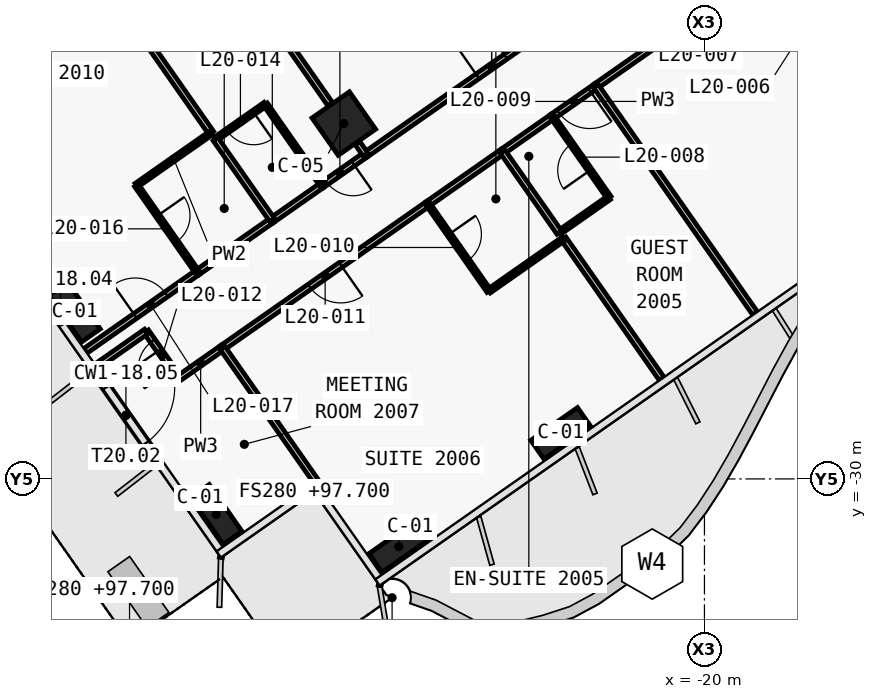
"""IFC4 building model, lengths in metres.
Left out: names, types, materials, properties, quantities, classifications, styles, units other than length and angle.
Written with IfcOpenShell. Run it as: python <this file> out.ifc"""

import sys

from ifc_helpers import new_model, si_unit, direction, frame, frame_2d, origin, origin_2d, place, context, subcontext, project, spatial, rectangle, extrude, element, fill, save


model = new_model("IFC4")
c1 = context("Model", 3, precision=1e-05, world=origin(), true_north=direction((0.0, 1.0)))
c2 = subcontext(c1, "Body", "Model", "MODEL_VIEW")
j1 = project(units=[si_unit("LENGTHUNIT", "METRE"), si_unit("PLANEANGLEUNIT", "RADIAN")], contexts=[c1])
p1 = place(None, origin())
s1 = spatial("IfcSite", under=j1, at=p1, CompositionType="ELEMENT")
p2 = place(p1, origin())
s2 = spatial("IfcBuilding", under=s1, at=p2, CompositionType="ELEMENT")
p3 = place(p2, frame((0.0, 0.0, 97.7)))
s3 = spatial("IfcBuildingStorey", under=s2, at=p3, CompositionType="ELEMENT", Elevation=97.7)
for number, where, z_axis, x_axis in (
    (1, (-23.782, -28.799, 0.0), (0.0, 0.0, 1.0), (-0.819, -0.574, 0.0)),
    (2, (-28.042, -31.782, 0.0), (0.0, 0.0, 1.0), (-0.819, -0.574, 0.0)),
    (3, (-32.847, -30.935, 0.0), (0.0, 0.0, 1.0), (-0.574, 0.819, 0.0)),
    (4, (-36.575, -25.61, 0.0), (0.0, 0.0, 1.0), (-0.574, 0.819, 0.0)),
):
    element("IfcColumn", number, at=place(p3, frame(where, z_axis=z_axis, x_axis=x_axis)), inside=s3, PredefinedType="COLUMN", context=c2, shape_type="SweptSolid", body=[
        extrude(rectangle(XDim=1.5, YDim=0.6, at=origin_2d()), origin(), (0.0, 0.0, 1.0), 3.6),
    ])
p4 = place(p3, frame((-29.49, -20.649, 0.0), z_axis=(0.0, 0.0, 1.0), x_axis=(-0.819152044289, -0.573576436351, 0.0)))
e5 = element("IfcColumn", 5, at=p4, inside=s3, PredefinedType="COLUMN", context=c2, shape_type="SweptSolid", body=[
    extrude(rectangle(XDim=1.2, YDim=1.2, at=origin_2d()), origin(), (0.0, 0.0, 1.0), 3.6),
])
p5 = place(p3, frame((-36.066, -27.122, 0.0), z_axis=(0.0, 0.0, 1.0), x_axis=(0.573584953252, -0.819146080625, 0.0)))
e6 = element("IfcWall", 6, at=p5, inside=s3, PredefinedType="SOLIDWALL", context=c2, shape_type="SweptSolid", body=[
    extrude(rectangle(XDim=2.94, YDim=0.2, at=frame_2d((1.47, 0.0))), origin(), (0.0, 0.0, 1.0), 3.32),
])
p6 = place(p5, frame((0.57, 0.0, 0.0)))
e7 = element("IfcOpeningElement", 7, at=p6, cuts=e6, PredefinedType="OPENING", context=c2, shape_type="SweptSolid", body=[
    extrude(rectangle(XDim=1.8, YDim=2.4, at=frame_2d((0.9, 1.2))), frame((0.0, 0.11, 0.0), z_axis=(0.0, -1.0, 0.0), x_axis=(1.0, 0.0, 0.0)), (0.0, 0.0, 1.0), 0.22),
])
p7 = place(p3, frame((-28.917, -21.469, 0.0), z_axis=(0.0, 0.0, 1.0), x_axis=(0.819152599934, 0.573575642807, 0.0)))
e8 = element("IfcWall", 8, at=p7, inside=s3, PredefinedType="PARTITIONING", context=c2, shape_type="SweptSolid", body=[
    extrude(rectangle(XDim=8.098, YDim=0.15, at=frame_2d((4.049, 0.0))), origin(), (0.0, 0.0, 1.0), 2.6),
])
p8 = place(p7, frame((3.599, 0.0, 0.0)))
e9 = element("IfcOpeningElement", 9, at=p8, cuts=e8, PredefinedType="OPENING", context=c2, shape_type="SweptSolid", body=[
    extrude(rectangle(XDim=0.9, YDim=2.1, at=frame_2d((0.45, 1.05))), frame((0.0, 0.085, 0.0), z_axis=(0.0, -1.0, 0.0), x_axis=(1.0, 0.0, 0.0)), (0.0, 0.0, 1.0), 0.17),
])
p9 = place(p3, frame((-28.914, -21.467, 0.0), z_axis=(0.0, 0.0, 1.0), x_axis=(-0.81914197737, -0.573590813132, 0.0)))
e10 = element("IfcWall", 10, at=p9, inside=s3, PredefinedType="PARTITIONING", context=c2, shape_type="SweptSolid", body=[
    extrude(rectangle(XDim=1.403, YDim=0.15, at=frame_2d((0.701, 0.0))), origin(), (0.0, 0.0, 1.0), 2.6),
])
p10 = place(p9, frame((0.403, 0.0, 0.0)))
e11 = element("IfcOpeningElement", 11, at=p10, cuts=e10, PredefinedType="OPENING", context=c2, shape_type="SweptSolid", body=[
    extrude(rectangle(XDim=0.85, YDim=2.1, at=frame_2d((0.425, 1.05))), frame((0.0, 0.085, 0.0), z_axis=(0.0, -1.0, 0.0), x_axis=(1.0, 0.0, 0.0)), (0.0, 0.0, 1.0), 0.17),
])
p11 = place(p3, frame((-31.375, -23.19, 0.0), z_axis=(0.0, 0.0, 1.0), x_axis=(0.819189013667, 0.573523634986, 0.0)))
e12 = element("IfcWall", 12, at=p11, inside=s3, PredefinedType="PARTITIONING", context=c2, shape_type="SweptSolid", body=[
    extrude(rectangle(XDim=1.604, YDim=0.15, at=frame_2d((0.802, 0.0))), origin(), (0.0, 0.0, 1.0), 3.32),
])
p12 = place(p3, frame((-36.288, -26.63, 0.0), z_axis=(0.0, 0.0, 1.0), x_axis=(0.819171400631, 0.573548791636, 0.0)))
e13 = element("IfcWall", 13, at=p12, inside=s3, PredefinedType="PARTITIONING", context=c2, shape_type="SweptSolid", body=[
    extrude(rectangle(XDim=3.601, YDim=0.15, at=frame_2d((1.801, 0.0))), origin(), (0.0, 0.0, 1.0), 2.5),
])
p13 = place(p12, frame((1.6, 0.0, 0.0)))
e14 = element("IfcOpeningElement", 14, at=p13, cuts=e13, PredefinedType="OPENING", context=c2, shape_type="SweptSolid", body=[
    extrude(rectangle(XDim=1.0, YDim=2.1, at=frame_2d((0.5, 1.05))), frame((0.0, 0.085, 0.0), z_axis=(0.0, -1.0, 0.0), x_axis=(1.0, 0.0, 0.0)), (0.0, 0.0, 1.0), 0.17),
])
p14 = place(p3, frame((-33.341, -24.566, 0.0), z_axis=(0.0, 0.0, 1.0), x_axis=(0.819179439794, 0.573537309527, 0.0)))
e15 = element("IfcWall", 15, at=p14, inside=s3, PredefinedType="PARTITIONING", context=c2, shape_type="SweptSolid", body=[
    extrude(rectangle(XDim=2.404, YDim=0.15, at=frame_2d((1.202, 0.0))), origin(), (0.0, 0.0, 1.0), 3.32),
])
p15 = place(p3, frame((-17.447, -15.879, 0.0), z_axis=(0.0, 0.0, 1.0), x_axis=(-0.819153746897, -0.573574004767, 0.0)))
e16 = element("IfcWall", 16, at=p15, inside=s3, PredefinedType="PARTITIONING", context=c2, shape_type="SweptSolid", body=[
    extrude(rectangle(XDim=6.603, YDim=0.15, at=frame_2d((3.302, 0.0))), origin(), (0.0, 0.0, 1.0), 2.6),
])
p16 = place(p15, frame((2.801, 0.0, 0.0)))
e17 = element("IfcOpeningElement", 17, at=p16, cuts=e16, PredefinedType="OPENING", context=c2, shape_type="SweptSolid", body=[
    extrude(rectangle(XDim=1.0, YDim=2.1, at=frame_2d((0.5, 1.05))), frame((0.0, 0.085, 0.0), z_axis=(0.0, -1.0, 0.0), x_axis=(1.0, 0.0, 0.0)), (0.0, 0.0, 1.0), 0.17),
])
p17 = place(p3, frame((-22.852, -19.664, 0.0), z_axis=(0.0, 0.0, 1.0), x_axis=(-0.81914197737, -0.573590813132, 0.0)))
e18 = element("IfcWall", 18, at=p17, inside=s3, PredefinedType="PARTITIONING", context=c2, shape_type="SweptSolid", body=[
    extrude(rectangle(XDim=1.403, YDim=0.15, at=frame_2d((0.701, 0.0))), origin(), (0.0, 0.0, 1.0), 3.32),
])
p18 = place(p17, frame((0.202, 0.0, 0.0)))
e19 = element("IfcOpeningElement", 19, at=p18, cuts=e18, PredefinedType="OPENING", context=c2, shape_type="SweptSolid", body=[
    extrude(rectangle(XDim=1.0, YDim=2.1, at=frame_2d((0.5, 1.05))), frame((0.0, 0.085, 0.0), z_axis=(0.0, -1.0, 0.0), x_axis=(1.0, 0.0, 0.0)), (0.0, 0.0, 1.0), 0.17),
])
p19 = place(p3, frame((-23.999, -20.467, 0.0), z_axis=(0.0, 0.0, 1.0), x_axis=(-0.819117502046, -0.573625764625, 0.0)))
e20 = element("IfcWall", 20, at=p19, inside=s3, PredefinedType="PARTITIONING", context=c2, shape_type="SweptSolid", body=[
    extrude(rectangle(XDim=1.604, YDim=0.15, at=frame_2d((0.802, 0.0))), origin(), (0.0, 0.0, 1.0), 3.32),
])
p20 = place(p3, frame((-27.276, -22.761, 0.0), z_axis=(0.0, 0.0, 1.0), x_axis=(-0.819153746897, -0.573574004767, 0.0)))
e21 = element("IfcWall", 21, at=p20, inside=s3, PredefinedType="PARTITIONING", context=c2, shape_type="SweptSolid", body=[
    extrude(rectangle(XDim=6.603, YDim=0.15, at=frame_2d((3.302, 0.0))), origin(), (0.0, 0.0, 1.0), 2.6),
])
p21 = place(p20, frame((2.801, 0.0, 0.0)))
e22 = element("IfcOpeningElement", 22, at=p21, cuts=e21, PredefinedType="OPENING", context=c2, shape_type="SweptSolid", body=[
    extrude(rectangle(XDim=1.0, YDim=2.1, at=frame_2d((0.5, 1.05))), frame((0.0, 0.085, 0.0), z_axis=(0.0, -1.0, 0.0), x_axis=(1.0, 0.0, 0.0)), (0.0, 0.0, 1.0), 0.17),
])
p22 = place(p3, frame((-25.31, -21.384, 0.0), z_axis=(0.0, 0.0, 1.0), x_axis=(-0.819146032251, -0.573585022335, 0.0)))
e23 = element("IfcWall", 23, at=p22, inside=s3, PredefinedType="PARTITIONING", context=c2, shape_type="SweptSolid", body=[
    extrude(rectangle(XDim=2.404, YDim=0.15, at=frame_2d((1.202, 0.0))), origin(), (0.0, 0.0, 1.0), 3.32),
])
p23 = place(p3, frame((-33.83, -27.351, 0.0), z_axis=(0.0, 0.0, 1.0), x_axis=(-0.573669850876, 0.819086626796, 0.0)))
e24 = element("IfcWall", 24, at=p23, inside=s3, PredefinedType="PARTITIONING", context=c2, shape_type="SweptSolid", body=[
    extrude(rectangle(XDim=1.5, YDim=0.15, at=frame_2d((0.75, 0.0))), origin(), (0.0, 0.0, 1.0), 3.32),
])
p24 = place(p23, frame((0.3, 0.0, 0.0)))
e25 = element("IfcOpeningElement", 25, at=p24, cuts=e24, PredefinedType="OPENING", context=c2, shape_type="SweptSolid", body=[
    extrude(rectangle(XDim=0.9, YDim=2.1, at=frame_2d((0.45, 1.05))), frame((0.0, 0.085, 0.0), z_axis=(0.0, -1.0, 0.0), x_axis=(1.0, 0.0, 0.0)), (0.0, 0.0, 1.0), 0.17),
])
p25 = place(p3, frame((-34.691, -26.122, 0.0), z_axis=(0.0, 0.0, 1.0), x_axis=(-0.819059844958, -0.573708088123, 0.0)))
e26 = element("IfcWall", 26, at=p25, inside=s3, PredefinedType="PARTITIONING", context=c2, shape_type="SweptSolid", body=[
    extrude(rectangle(XDim=1.6, YDim=0.15, at=frame_2d((0.8, 0.0))), origin(), (0.0, 0.0, 1.0), 2.5),
])
p26 = place(p3, frame((-32.682, -26.546, 0.0), z_axis=(0.0, 0.0, 1.0), x_axis=(-0.819133738125, -0.573602579375, 0.0)))
e27 = element("IfcWall", 27, at=p26, inside=s3, PredefinedType="PARTITIONING", context=c2, shape_type="SweptSolid", body=[
    extrude(rectangle(XDim=1.402, YDim=0.15, at=frame_2d((0.701, 0.0))), origin(), (0.0, 0.0, 1.0), 3.32),
])
p27 = place(p3, frame((-28.916, -21.468, 0.0), z_axis=(0.0, 0.0, 1.0), x_axis=(-0.572944929411, 0.819593867633, 0.0)))
e28 = element("IfcWall", 28, at=p27, inside=s3, PredefinedType="PARTITIONING", context=c2, shape_type="SweptSolid", body=[
    extrude(rectangle(XDim=0.38, YDim=0.15, at=frame_2d((0.19, 0.0))), origin(), (0.0, 0.0, 1.0), 2.6),
])
p28 = place(p3, frame((-29.845, -20.141, 0.0), z_axis=(0.0, 0.0, 1.0), x_axis=(-0.573558725113, 0.819164445546, 0.0)))
e29 = element("IfcWall", 29, at=p28, inside=s3, PredefinedType="PARTITIONING", context=c2, shape_type="SweptSolid", body=[
    extrude(rectangle(XDim=9.01, YDim=0.15, at=frame_2d((4.505, 0.0))), origin(), (0.0, 0.0, 1.0), 2.6),
])
p29 = place(p3, frame((-30.062, -22.27, 0.0), z_axis=(0.0, 0.0, 1.0), x_axis=(-0.573537965655, 0.819178980414, 0.0)))
e30 = element("IfcWall", 30, at=p29, inside=s3, PredefinedType="PARTITIONING", context=c2, shape_type="SweptSolid", body=[
    extrude(rectangle(XDim=2.6, YDim=0.12, at=frame_2d((1.3, 0.0))), origin(), (0.0, 0.0, 1.0), 2.6),
])
p30 = place(p3, frame((-31.555, -20.14, 0.0), z_axis=(0.0, 0.0, 1.0), x_axis=(-0.819131543282, -0.57360571371, 0.0)))
e31 = element("IfcWall", 31, at=p30, inside=s3, PredefinedType="PARTITIONING", context=c2, shape_type="SweptSolid", body=[
    extrude(rectangle(XDim=1.6, YDim=0.12, at=frame_2d((0.8, 0.0))), origin(), (0.0, 0.0, 1.0), 3.32),
])
p31 = place(p30, frame((0.375, 0.0, 0.0)))
e32 = element("IfcOpeningElement", 32, at=p31, cuts=e31, PredefinedType="OPENING", context=c2, shape_type="SweptSolid", body=[
    extrude(rectangle(XDim=0.85, YDim=2.05, at=frame_2d((0.425, 1.025))), frame((0.0, 0.07, 0.0), z_axis=(0.0, -1.0, 0.0), x_axis=(1.0, 0.0, 0.0)), (0.0, 0.0, 1.0), 0.14),
])
p32 = place(p3, frame((-32.979, -20.896, 0.0), z_axis=(0.0, 0.0, 1.0), x_axis=(-0.573576058406, 0.819152308929, 0.0)))
e33 = element("IfcWall", 33, at=p32, inside=s3, PredefinedType="PARTITIONING", context=c2, shape_type="SweptSolid", body=[
    extrude(rectangle(XDim=8.501, YDim=0.15, at=frame_2d((4.25, 0.0))), origin(), (0.0, 0.0, 1.0), 2.5),
])
p33 = place(p3, frame((-31.373, -23.189, 0.0), z_axis=(0.0, 0.0, 1.0), x_axis=(-0.573600972199, 0.819134863556, 0.0)))
e34 = element("IfcWall", 34, at=p33, inside=s3, PredefinedType="PARTITIONING", context=c2, shape_type="SweptSolid", body=[
    extrude(rectangle(XDim=2.6, YDim=0.15, at=frame_2d((1.3, 0.0))), origin(), (0.0, 0.0, 1.0), 2.6),
])
p34 = place(p3, frame((-32.98, -20.894, 0.0), z_axis=(0.0, 0.0, 1.0), x_axis=(-0.819155442668, -0.573571582932, 0.0)))
e35 = element("IfcWall", 35, at=p34, inside=s3, PredefinedType="PARTITIONING", context=c2, shape_type="SweptSolid", body=[
    extrude(rectangle(XDim=2.4, YDim=0.12, at=frame_2d((1.2, 0.0))), origin(), (0.0, 0.0, 1.0), 3.32),
])
p35 = place(p3, frame((-34.946, -22.272, 0.0), z_axis=(0.0, 0.0, 1.0), x_axis=(0.573608623498, -0.819129505664, 0.0)))
e36 = element("IfcWall", 36, at=p35, inside=s3, PredefinedType="PARTITIONING", context=c2, shape_type="SweptSolid", body=[
    extrude(rectangle(XDim=2.8, YDim=0.12, at=frame_2d((1.4, 0.0))), origin(), (0.0, 0.0, 1.0), 2.6),
])
p36 = place(p35, frame((0.975, 0.0, 0.0)))
e37 = element("IfcOpeningElement", 37, at=p36, cuts=e36, PredefinedType="OPENING", context=c2, shape_type="SweptSolid", body=[
    extrude(rectangle(XDim=0.85, YDim=2.05, at=frame_2d((0.425, 1.025))), frame((0.0, 0.07, 0.0), z_axis=(0.0, -1.0, 0.0), x_axis=(1.0, 0.0, 0.0)), (0.0, 0.0, 1.0), 0.14),
])
p37 = place(p3, frame((-18.667, -25.645, 0.0), z_axis=(0.0, 0.0, 1.0), x_axis=(-0.573572324301, 0.819154923562, 0.0)))
e38 = element("IfcWall", 38, at=p37, inside=s3, PredefinedType="PARTITIONING", context=c2, shape_type="SweptSolid", body=[
    extrude(rectangle(XDim=7.3, YDim=0.15, at=frame_2d((3.65, 0.0))), origin(), (0.0, 0.0, 1.0), 2.5),
])
p38 = place(p3, frame((-23.819, -23.516, 0.0), z_axis=(0.0, 0.0, 1.0), x_axis=(0.819131543282, 0.57360571371, 0.0)))
e39 = element("IfcWall", 39, at=p38, inside=s3, PredefinedType="PARTITIONING", context=c2, shape_type="SweptSolid", body=[
    extrude(rectangle(XDim=1.6, YDim=0.12, at=frame_2d((0.8, 0.0))), origin(), (0.0, 0.0, 1.0), 3.32),
])
p39 = place(p3, frame((-22.509, -22.597, 0.0), z_axis=(0.0, 0.0, 1.0), x_axis=(-0.573582085028, 0.819148089014, 0.0)))
e40 = element("IfcWall", 40, at=p39, inside=s3, PredefinedType="PARTITIONING", context=c2, shape_type="SweptSolid", body=[
    extrude(rectangle(XDim=2.6, YDim=0.12, at=frame_2d((1.3, 0.0))), origin(), (0.0, 0.0, 1.0), 3.32),
])
p40 = place(p39, frame((0.875, 0.0, 0.0)))
e41 = element("IfcOpeningElement", 41, at=p40, cuts=e40, PredefinedType="OPENING", context=c2, shape_type="SweptSolid", body=[
    extrude(rectangle(XDim=0.85, YDim=2.05, at=frame_2d((0.425, 1.025))), frame((0.0, 0.07, 0.0), z_axis=(0.0, -1.0, 0.0), x_axis=(1.0, 0.0, 0.0)), (0.0, 0.0, 1.0), 0.14),
])
p41 = place(p3, frame((-21.124, -27.365, 0.0), z_axis=(0.0, 0.0, 1.0), x_axis=(-0.573556991349, 0.819165659482, 0.0)))
e42 = element("IfcWall", 42, at=p41, inside=s3, PredefinedType="PARTITIONING", context=c2, shape_type="SweptSolid", body=[
    extrude(rectangle(XDim=4.501, YDim=0.15, at=frame_2d((2.25, 0.0))), origin(), (0.0, 0.0, 1.0), 2.5),
])
p42 = place(p3, frame((-23.82, -23.515, 0.0), z_axis=(0.0, 0.0, 1.0), x_axis=(-0.573537965655, 0.819178980414, 0.0)))
e43 = element("IfcWall", 43, at=p42, inside=s3, PredefinedType="PARTITIONING", context=c2, shape_type="SweptSolid", body=[
    extrude(rectangle(XDim=2.6, YDim=0.15, at=frame_2d((1.3, 0.0))), origin(), (0.0, 0.0, 1.0), 3.32),
])
p43 = place(p3, frame((-27.278, -22.763, 0.0), z_axis=(0.0, 0.0, 1.0), x_axis=(0.573550118428, -0.819170471667, 0.0)))
e44 = element("IfcWall", 44, at=p43, inside=s3, PredefinedType="PARTITIONING", context=c2, shape_type="SweptSolid", body=[
    extrude(rectangle(XDim=2.8, YDim=0.12, at=frame_2d((1.4, 0.0))), origin(), (0.0, 0.0, 1.0), 3.32),
])
p44 = place(p43, frame((0.975, 0.0, 0.0)))
e45 = element("IfcOpeningElement", 45, at=p44, cuts=e44, PredefinedType="OPENING", context=c2, shape_type="SweptSolid", body=[
    extrude(rectangle(XDim=0.85, YDim=2.05, at=frame_2d((0.425, 1.025))), frame((0.0, 0.07, 0.0), z_axis=(0.0, -1.0, 0.0), x_axis=(1.0, 0.0, 0.0)), (0.0, 0.0, 1.0), 0.14),
])
p45 = place(p3, frame((-25.671, -25.056, 0.0), z_axis=(0.0, 0.0, 1.0), x_axis=(0.819188907105, 0.573523787192, 0.0)))
e46 = element("IfcWall", 46, at=p45, inside=s3, PredefinedType="PARTITIONING", context=c2, shape_type="SweptSolid", body=[
    extrude(rectangle(XDim=2.4, YDim=0.12, at=frame_2d((1.2, 0.0))), origin(), (0.0, 0.0, 1.0), 3.32),
])
p46 = place(p3, frame((-30.101, -30.236, 0.0), z_axis=(0.0, 0.0, 1.0), x_axis=(-0.573564243949, 0.819160581365, 0.0)))
e47 = element("IfcWall", 47, at=p46, inside=s3, PredefinedType="PARTITIONING", context=c2, shape_type="SweptSolid", body=[
    extrude(rectangle(XDim=4.502, YDim=0.15, at=frame_2d((2.251, 0.0))), origin(), (0.0, 0.0, 1.0), 3.32),
])
p47 = place(p6, origin())
e48 = element("IfcDoor", 48, at=p47, inside=s3, OperationType="DOUBLE_DOOR_DOUBLE_SWING", PredefinedType="DOOR", context=c2, shape_type="SweptSolid", body=[
    extrude(rectangle(XDim=1.8, YDim=2.4, at=frame_2d((0.9, 1.2))), frame((0.0, 0.025, 0.0), z_axis=(0.0, -1.0, 0.0), x_axis=(1.0, 0.0, 0.0)), (0.0, 0.0, 1.0), 0.05),
])
fill(e7, e48)
p48 = place(p40, origin())
e49 = element("IfcDoor", 49, at=p48, inside=s3, OperationType="SINGLE_SWING_LEFT", PredefinedType="DOOR", context=c2, shape_type="SweptSolid", body=[
    extrude(rectangle(XDim=0.85, YDim=2.05, at=frame_2d((0.425, 1.025))), frame((0.0, 0.025, 0.0), z_axis=(0.0, -1.0, 0.0), x_axis=(1.0, 0.0, 0.0)), (0.0, 0.0, 1.0), 0.05),
])
fill(e41, e49)
p49 = place(p18, origin())
e50 = element("IfcDoor", 50, at=p49, inside=s3, OperationType="SINGLE_SWING_RIGHT", PredefinedType="DOOR", context=c2, shape_type="SweptSolid", body=[
    extrude(rectangle(XDim=1.0, YDim=2.1, at=frame_2d((0.5, 1.05))), frame((0.0, 0.025, 0.0), z_axis=(0.0, -1.0, 0.0), x_axis=(1.0, 0.0, 0.0)), (0.0, 0.0, 1.0), 0.05),
])
fill(e19, e50)
p50 = place(p44, origin())
e51 = element("IfcDoor", 51, at=p50, inside=s3, OperationType="SINGLE_SWING_RIGHT", PredefinedType="DOOR", context=c2, shape_type="SweptSolid", body=[
    extrude(rectangle(XDim=0.85, YDim=2.05, at=frame_2d((0.425, 1.025))), frame((0.0, 0.025, 0.0), z_axis=(0.0, -1.0, 0.0), x_axis=(1.0, 0.0, 0.0)), (0.0, 0.0, 1.0), 0.05),
])
fill(e45, e51)
p51 = place(p21, origin())
e52 = element("IfcDoor", 52, at=p51, inside=s3, OperationType="SINGLE_SWING_RIGHT", PredefinedType="DOOR", context=c2, shape_type="SweptSolid", body=[
    extrude(rectangle(XDim=1.0, YDim=2.1, at=frame_2d((0.5, 1.05))), frame((0.0, 0.025, 0.0), z_axis=(0.0, -1.0, 0.0), x_axis=(1.0, 0.0, 0.0)), (0.0, 0.0, 1.0), 0.05),
])
fill(e22, e52)
p52 = place(p24, origin())
e53 = element("IfcDoor", 53, at=p52, inside=s3, OperationType="SINGLE_SWING_LEFT", PredefinedType="DOOR", context=c2, shape_type="SweptSolid", body=[
    extrude(rectangle(XDim=0.9, YDim=2.1, at=frame_2d((0.45, 1.05))), frame((0.0, 0.025, 0.0), z_axis=(0.0, -1.0, 0.0), x_axis=(1.0, 0.0, 0.0)), (0.0, 0.0, 1.0), 0.05),
])
fill(e25, e53)
p53 = place(p8, origin())
e54 = element("IfcDoor", 54, at=p53, inside=s3, OperationType="SINGLE_SWING_LEFT", PredefinedType="DOOR", context=c2, shape_type="SweptSolid", body=[
    extrude(rectangle(XDim=0.9, YDim=2.1, at=frame_2d((0.45, 1.05))), frame((0.0, 0.025, 0.0), z_axis=(0.0, -1.0, 0.0), x_axis=(1.0, 0.0, 0.0)), (0.0, 0.0, 1.0), 0.05),
])
fill(e9, e54)
p54 = place(p31, origin())
e55 = element("IfcDoor", 55, at=p54, inside=s3, OperationType="SINGLE_SWING_RIGHT", PredefinedType="DOOR", context=c2, shape_type="SweptSolid", body=[
    extrude(rectangle(XDim=0.85, YDim=2.05, at=frame_2d((0.425, 1.025))), frame((0.0, 0.025, 0.0), z_axis=(0.0, -1.0, 0.0), x_axis=(1.0, 0.0, 0.0)), (0.0, 0.0, 1.0), 0.05),
])
fill(e32, e55)
p55 = place(p10, origin())
e56 = element("IfcDoor", 56, at=p55, inside=s3, OperationType="SINGLE_SWING_LEFT", PredefinedType="DOOR", context=c2, shape_type="SweptSolid", body=[
    extrude(rectangle(XDim=0.85, YDim=2.1, at=frame_2d((0.425, 1.05))), frame((0.0, 0.025, 0.0), z_axis=(0.0, -1.0, 0.0), x_axis=(1.0, 0.0, 0.0)), (0.0, 0.0, 1.0), 0.05),
])
fill(e11, e56)
p56 = place(p36, origin())
e57 = element("IfcDoor", 57, at=p56, inside=s3, OperationType="SINGLE_SWING_RIGHT", PredefinedType="DOOR", context=c2, shape_type="SweptSolid", body=[
    extrude(rectangle(XDim=0.85, YDim=2.05, at=frame_2d((0.425, 1.025))), frame((0.0, 0.025, 0.0), z_axis=(0.0, -1.0, 0.0), x_axis=(1.0, 0.0, 0.0)), (0.0, 0.0, 1.0), 0.05),
])
fill(e37, e57)
p57 = place(p13, origin())
e58 = element("IfcDoor", 58, at=p57, inside=s3, OperationType="SINGLE_SWING_RIGHT", PredefinedType="DOOR", context=c2, shape_type="SweptSolid", body=[
    extrude(rectangle(XDim=1.0, YDim=2.1, at=frame_2d((0.5, 1.05))), frame((0.0, 0.025, 0.0), z_axis=(0.0, -1.0, 0.0), x_axis=(1.0, 0.0, 0.0)), (0.0, 0.0, 1.0), 0.05),
])
fill(e14, e58)
save(model, sys.argv[1])
